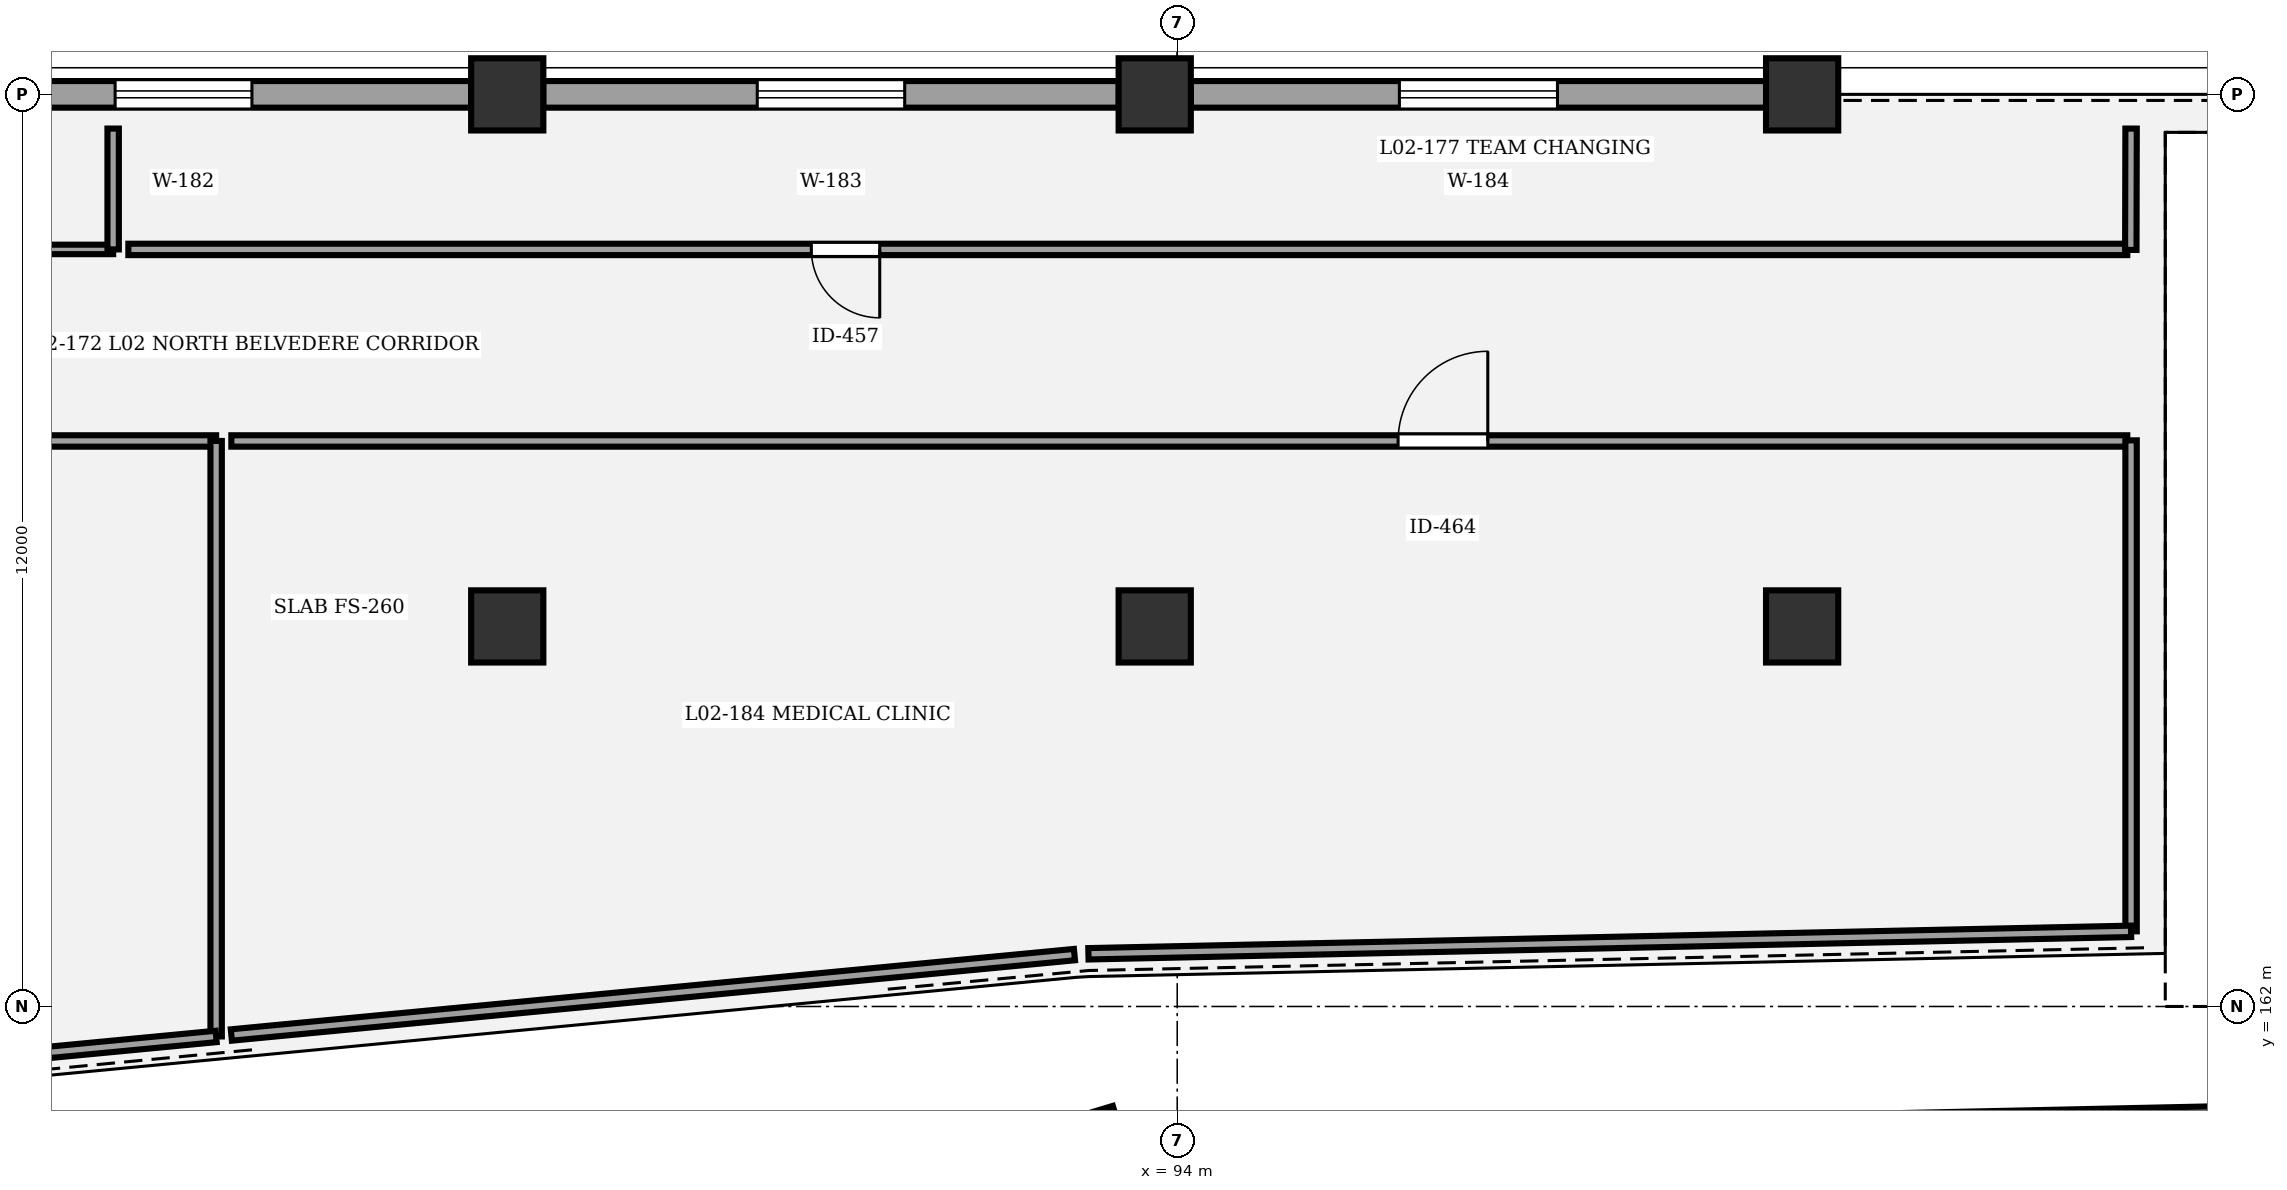
"""IFC4 building model, lengths in metres.
Left out: names, types, materials, properties, quantities, classifications, styles, units other than length and angle.
Written with IfcOpenShell. Run it as: python <this file> out.ifc"""

import sys

from ifc_helpers import new_model, si_unit, direction, frame, frame_2d, origin, origin_2d, place, context, subcontext, project, spatial, rectangle, circle, extrude, element, fill, save


model = new_model("IFC4")
c1 = context("Model", 3, precision=1e-05, world=origin(), true_north=direction((0.0, 1.0)))
c2 = subcontext(c1, "Body", "Model", "MODEL_VIEW")
j1 = project(units=[si_unit("LENGTHUNIT", "METRE"), si_unit("PLANEANGLEUNIT", "RADIAN")], contexts=[c1])
p1 = place(None, origin())
s1 = spatial("IfcSite", under=j1, at=p1, CompositionType="ELEMENT")
p2 = place(p1, origin())
s2 = spatial("IfcBuilding", under=s1, at=p2, CompositionType="ELEMENT")
p3 = place(p2, frame((0.0, 0.0, 10.2)))
s3 = spatial("IfcBuildingStorey", under=s2, at=p3, CompositionType="ELEMENT", Elevation=10.2)
p4 = place(p3, frame((92.885, 160.194, 0.0), z_axis=(0.0, 0.0, 1.0), x_axis=(-0.289198876314, 0.957269037387, 0.0)))
e1 = element("IfcColumn", 1, at=p4, inside=s3, PredefinedType="COLUMN", context=c2, shape_type="SweptSolid", body=[
    extrude(rectangle(XDim=0.8, YDim=0.8, at=origin_2d()), origin(), (0.0, 0.0, 1.0), 4.5),
])
for number, where, z_axis, x_axis in (
    (2, (85.185, 167.0, 0.0), (0.0, 0.0, 1.0), (1.0, 0.0, 0.0)),
    (3, (85.185, 174.0, 0.0), (0.0, 0.0, 1.0), (1.0, 0.0, 0.0)),
    (4, (93.704, 167.0, 0.0), (0.0, 0.0, 1.0), (1.0, 0.0, 0.0)),
    (5, (93.704, 174.0, 0.0), (0.0, 0.0, 1.0), (1.0, 0.0, 0.0)),
    (6, (102.222, 167.0, 0.0), (0.0, 0.0, 1.0), (1.0, 0.0, 0.0)),
    (7, (102.222, 174.0, 0.0), (0.0, 0.0, 1.0), (1.0, 0.0, 0.0)),
):
    element("IfcColumn", number, at=place(p3, frame(where, z_axis=z_axis, x_axis=x_axis)), inside=s3, PredefinedType="COLUMN", context=c2, shape_type="SweptSolid", body=[
        extrude(circle(Radius=0.475, at=origin_2d()), origin(), (0.0, 0.0, 1.0), 4.5),
    ])
p5 = place(p3, frame((114.602, 160.661, 0.0), z_axis=(0.0, 0.0, 1.0), x_axis=(-0.999768320606, -0.021524523519, 0.0)))
e8 = element("IfcWall", 8, at=p5, inside=s3, PredefinedType="STANDARD", context=c2, shape_type="SweptSolid", body=[
    extrude(rectangle(XDim=21.324, YDim=0.35, at=frame_2d((10.662, 0.0))), origin(), (0.0, 0.0, 1.0), 3.42),
])
p6 = place(p5, frame((10.042, 0.0, 0.9)))
e9 = element("IfcOpeningElement", 9, at=p6, cuts=e8, PredefinedType="OPENING", context=c2, shape_type="SweptSolid", body=[
    extrude(rectangle(XDim=1.24, YDim=1.95, at=frame_2d((0.62, 0.975))), frame((0.0, 0.185, 0.0), z_axis=(0.0, -1.0, 0.0), x_axis=(1.0, 0.0, 0.0)), (0.0, 0.0, 1.0), 0.37),
])
p7 = place(p3, frame((77.14, 174.0, 0.0), z_axis=(0.0, 0.0, 1.0), x_axis=(1.0, 0.0, 0.0)))
e10 = element("IfcWall", 10, at=p7, inside=s3, PredefinedType="STANDARD", context=c2, shape_type="SweptSolid", body=[
    extrude(rectangle(XDim=7.572, YDim=0.35, at=frame_2d((3.786, 0.0))), origin(), (0.0, 0.0, 1.0), 3.26),
])
p8 = place(p7, frame((2.886, 0.0, 0.9)))
e11 = element("IfcOpeningElement", 11, at=p8, cuts=e10, PredefinedType="OPENING", context=c2, shape_type="SweptSolid", body=[
    extrude(rectangle(XDim=1.8, YDim=1.55, at=frame_2d((0.9, 0.775))), frame((0.0, 0.185, 0.0), z_axis=(0.0, -1.0, 0.0), x_axis=(1.0, 0.0, 0.0)), (0.0, 0.0, 1.0), 0.37),
])
p9 = place(p3, frame((85.658, 174.0, 0.0), z_axis=(0.0, 0.0, 1.0), x_axis=(1.0, 0.0, 0.0)))
e12 = element("IfcWall", 12, at=p9, inside=s3, PredefinedType="STANDARD", context=c2, shape_type="SweptSolid", body=[
    extrude(rectangle(XDim=7.573, YDim=0.35, at=frame_2d((3.787, 0.0))), origin(), (0.0, 0.0, 1.0), 3.26),
])
p10 = place(p9, frame((2.816, 0.0, 0.9)))
e13 = element("IfcOpeningElement", 13, at=p10, cuts=e12, PredefinedType="OPENING", context=c2, shape_type="SweptSolid", body=[
    extrude(rectangle(XDim=1.94, YDim=1.55, at=frame_2d((0.97, 0.775))), frame((0.0, 0.185, 0.0), z_axis=(0.0, -1.0, 0.0), x_axis=(1.0, 0.0, 0.0)), (0.0, 0.0, 1.0), 0.37),
])
p11 = place(p3, frame((94.177, 174.0, 0.0), z_axis=(0.0, 0.0, 1.0), x_axis=(1.0, 0.0, 0.0)))
e14 = element("IfcWall", 14, at=p11, inside=s3, PredefinedType="STANDARD", context=c2, shape_type="SweptSolid", body=[
    extrude(rectangle(XDim=7.572, YDim=0.35, at=frame_2d((3.786, 0.0))), origin(), (0.0, 0.0, 1.0), 3.26),
])
p12 = place(p11, frame((2.746, 0.0, 0.9)))
e15 = element("IfcOpeningElement", 15, at=p12, cuts=e14, PredefinedType="OPENING", context=c2, shape_type="SweptSolid", body=[
    extrude(rectangle(XDim=2.08, YDim=1.55, at=frame_2d((1.04, 0.775))), frame((0.0, 0.185, 0.0), z_axis=(0.0, -1.0, 0.0), x_axis=(1.0, 0.0, 0.0)), (0.0, 0.0, 1.0), 0.37),
])
p13 = place(p3, frame((80.0, 171.96, 0.0), z_axis=(0.0, 0.0, 1.0), x_axis=(-1.0, 0.0, 0.0)))
e16 = element("IfcWall", 16, at=p13, inside=s3, PredefinedType="PARTITIONING", context=c2, shape_type="SweptSolid", body=[
    extrude(rectangle(XDim=26.1, YDim=0.125, at=frame_2d((13.05, 0.0))), origin(), (0.0, 0.0, 1.0), 3.25),
])
p14 = place(p13, frame((15.959, 0.0, 0.0)))
e17 = element("IfcOpeningElement", 17, at=p14, cuts=e16, PredefinedType="OPENING", context=c2, shape_type="SweptSolid", body=[
    extrude(rectangle(XDim=1.4, YDim=2.2, at=frame_2d((0.7, 1.1))), frame((0.0, 0.073, 0.0), z_axis=(0.0, -1.0, 0.0), x_axis=(1.0, 0.0, 0.0)), (0.0, 0.0, 1.0), 0.145),
])
p15 = place(p3, frame((106.5, 171.96, 0.0), z_axis=(0.0, 0.0, 1.0), x_axis=(-1.0, 0.0, 0.0)))
e18 = element("IfcWall", 18, at=p15, inside=s3, PredefinedType="PARTITIONING", context=c2, shape_type="SweptSolid", body=[
    extrude(rectangle(XDim=26.3, YDim=0.15, at=frame_2d((13.15, 0.0))), origin(), (0.0, 0.0, 1.0), 3.25),
])
p16 = place(p15, frame((16.414, 0.0, 0.0)))
e19 = element("IfcOpeningElement", 19, at=p16, cuts=e18, PredefinedType="OPENING", context=c2, shape_type="SweptSolid", body=[
    extrude(rectangle(XDim=0.9, YDim=2.3, at=frame_2d((0.45, 1.15))), frame((0.0, 0.085, 0.0), z_axis=(0.0, -1.0, 0.0), x_axis=(1.0, 0.0, 0.0)), (0.0, 0.0, 1.0), 0.17),
])
p17 = place(p3, frame((56.36, 169.44, 0.0), z_axis=(0.0, 0.0, 1.0), x_axis=(1.0, 0.0, 0.0)))
e20 = element("IfcWall", 20, at=p17, inside=s3, PredefinedType="PARTITIONING", context=c2, shape_type="SweptSolid", body=[
    extrude(rectangle(XDim=24.995, YDim=0.15, at=frame_2d((12.498, 0.0))), origin(), (0.0, 0.0, 1.0), 3.25),
])
p18 = place(p17, frame((15.41, 0.0, 0.0)))
e21 = element("IfcOpeningElement", 21, at=p18, cuts=e20, PredefinedType="OPENING", context=c2, shape_type="SweptSolid", body=[
    extrude(rectangle(XDim=1.14, YDim=2.3, at=frame_2d((0.57, 1.15))), frame((0.0, 0.085, 0.0), z_axis=(0.0, -1.0, 0.0), x_axis=(1.0, 0.0, 0.0)), (0.0, 0.0, 1.0), 0.17),
])
p19 = place(p3, frame((81.555, 169.44, 0.0), z_axis=(0.0, 0.0, 1.0), x_axis=(1.0, 0.0, 0.0)))
e22 = element("IfcWall", 22, at=p19, inside=s3, PredefinedType="PARTITIONING", context=c2, shape_type="SweptSolid", body=[
    extrude(rectangle(XDim=24.945, YDim=0.15, at=frame_2d((12.473, 0.0))), origin(), (0.0, 0.0, 1.0), 3.25),
])
p20 = place(p19, frame((15.351, 0.0, 0.0)))
e23 = element("IfcOpeningElement", 23, at=p20, cuts=e22, PredefinedType="OPENING", context=c2, shape_type="SweptSolid", body=[
    extrude(rectangle(XDim=1.18, YDim=2.3, at=frame_2d((0.59, 1.15))), frame((0.0, 0.085, 0.0), z_axis=(0.0, -1.0, 0.0), x_axis=(1.0, 0.0, 0.0)), (0.0, 0.0, 1.0), 0.17),
])
p21 = place(p3, frame((80.0, 173.55, 0.0), z_axis=(0.0, 0.0, 1.0), x_axis=(0.0, -1.0, 0.0)))
e24 = element("IfcWall", 24, at=p21, inside=s3, PredefinedType="PARTITIONING", context=c2, shape_type="SweptSolid", body=[
    extrude(rectangle(XDim=1.59, YDim=0.15, at=frame_2d((0.795, 0.0))), origin(), (0.0, 0.0, 1.0), 3.25),
])
p22 = place(p3, frame((106.55, 173.55, 0.0), z_axis=(0.0, 0.0, 1.0), x_axis=(-0.002293221305, -0.999997370565, 0.0)))
e25 = element("IfcWall", 25, at=p22, inside=s3, PredefinedType="PARTITIONING", context=c2, shape_type="SweptSolid", body=[
    extrude(rectangle(XDim=1.597, YDim=0.15, at=frame_2d((0.798, 0.0))), origin(), (0.0, 0.0, 1.0), 3.25),
])
p23 = place(p3, frame((81.355, 169.44, 0.0), z_axis=(0.0, 0.0, 1.0), x_axis=(0.0, -1.0, 0.0)))
e26 = element("IfcWall", 26, at=p23, inside=s3, PredefinedType="PARTITIONING", context=c2, shape_type="SweptSolid", body=[
    extrude(rectangle(XDim=7.834, YDim=0.15, at=frame_2d((3.917, 0.0))), origin(), (0.0, 0.0, 1.0), 3.25),
])
p24 = place(p3, frame((81.355, 161.606, 0.0), z_axis=(0.0, 0.0, 1.0), x_axis=(-0.995481155674, -0.094959300221, 0.0)))
e27 = element("IfcWall", 27, at=p24, inside=s3, PredefinedType="PARTITIONING", context=c2, shape_type="SweptSolid", body=[
    extrude(rectangle(XDim=3.682, YDim=0.15, at=frame_2d((1.841, 0.0))), origin(), (0.0, 0.0, 1.0), 3.25),
])
p25 = place(p3, frame((92.648, 162.683, 0.0), z_axis=(0.0, 0.0, 1.0), x_axis=(-0.995483944756, -0.094930057059, 0.0)))
e28 = element("IfcWall", 28, at=p25, inside=s3, PredefinedType="PARTITIONING", context=c2, shape_type="SweptSolid", body=[
    extrude(rectangle(XDim=11.144, YDim=0.15, at=frame_2d((5.572, 0.0))), origin(), (0.0, 0.0, 1.0), 3.25),
])
p26 = place(p3, frame((106.55, 169.448, 0.0), z_axis=(0.0, 0.0, 1.0), x_axis=(0.0, -1.0, 0.0)))
e29 = element("IfcWall", 29, at=p26, inside=s3, PredefinedType="PARTITIONING", context=c2, shape_type="SweptSolid", body=[
    extrude(rectangle(XDim=6.46, YDim=0.15, at=frame_2d((3.23, 0.0))), origin(), (0.0, 0.0, 1.0), 3.25),
])
p27 = place(p3, frame((106.55, 162.989, 0.0), z_axis=(0.0, 0.0, 1.0), x_axis=(-0.999768230535, -0.021528706714, 0.0)))
e30 = element("IfcWall", 30, at=p27, inside=s3, PredefinedType="PARTITIONING", context=c2, shape_type="SweptSolid", body=[
    extrude(rectangle(XDim=13.722, YDim=0.15, at=frame_2d((6.861, 0.0))), origin(), (0.0, 0.0, 1.0), 3.25),
])
p28 = place(p8, origin())
e31 = element("IfcWindow", 31, at=p28, inside=s3, PartitioningType="SINGLE_PANEL", PredefinedType="WINDOW", context=c2, shape_type="SweptSolid", body=[
    extrude(rectangle(XDim=1.8, YDim=1.55, at=frame_2d((0.9, 0.775))), frame((0.0, 0.03, 0.0), z_axis=(0.0, -1.0, 0.0), x_axis=(1.0, 0.0, 0.0)), (0.0, 0.0, 1.0), 0.06),
])
fill(e11, e31)
p29 = place(p10, origin())
e32 = element("IfcWindow", 32, at=p29, inside=s3, PartitioningType="SINGLE_PANEL", PredefinedType="WINDOW", context=c2, shape_type="SweptSolid", body=[
    extrude(rectangle(XDim=1.94, YDim=1.55, at=frame_2d((0.97, 0.775))), frame((0.0, 0.03, 0.0), z_axis=(0.0, -1.0, 0.0), x_axis=(1.0, 0.0, 0.0)), (0.0, 0.0, 1.0), 0.06),
])
fill(e13, e32)
p30 = place(p12, origin())
e33 = element("IfcWindow", 33, at=p30, inside=s3, PartitioningType="SINGLE_PANEL", PredefinedType="WINDOW", context=c2, shape_type="SweptSolid", body=[
    extrude(rectangle(XDim=2.08, YDim=1.55, at=frame_2d((1.04, 0.775))), frame((0.0, 0.03, 0.0), z_axis=(0.0, -1.0, 0.0), x_axis=(1.0, 0.0, 0.0)), (0.0, 0.0, 1.0), 0.06),
])
fill(e15, e33)
p31 = place(p16, origin())
e34 = element("IfcDoor", 34, at=p31, inside=s3, OperationType="SINGLE_SWING_LEFT", PredefinedType="DOOR", context=c2, shape_type="SweptSolid", body=[
    extrude(rectangle(XDim=0.9, YDim=2.3, at=frame_2d((0.45, 1.15))), frame((0.0, 0.025, 0.0), z_axis=(0.0, -1.0, 0.0), x_axis=(1.0, 0.0, 0.0)), (0.0, 0.0, 1.0), 0.05),
])
fill(e19, e34)
p32 = place(p20, origin())
e35 = element("IfcDoor", 35, at=p32, inside=s3, OperationType="SINGLE_SWING_RIGHT", PredefinedType="DOOR", context=c2, shape_type="SweptSolid", body=[
    extrude(rectangle(XDim=1.18, YDim=2.3, at=frame_2d((0.59, 1.15))), frame((0.0, 0.025, 0.0), z_axis=(0.0, -1.0, 0.0), x_axis=(1.0, 0.0, 0.0)), (0.0, 0.0, 1.0), 0.05),
])
fill(e23, e35)
save(model, sys.argv[1])
